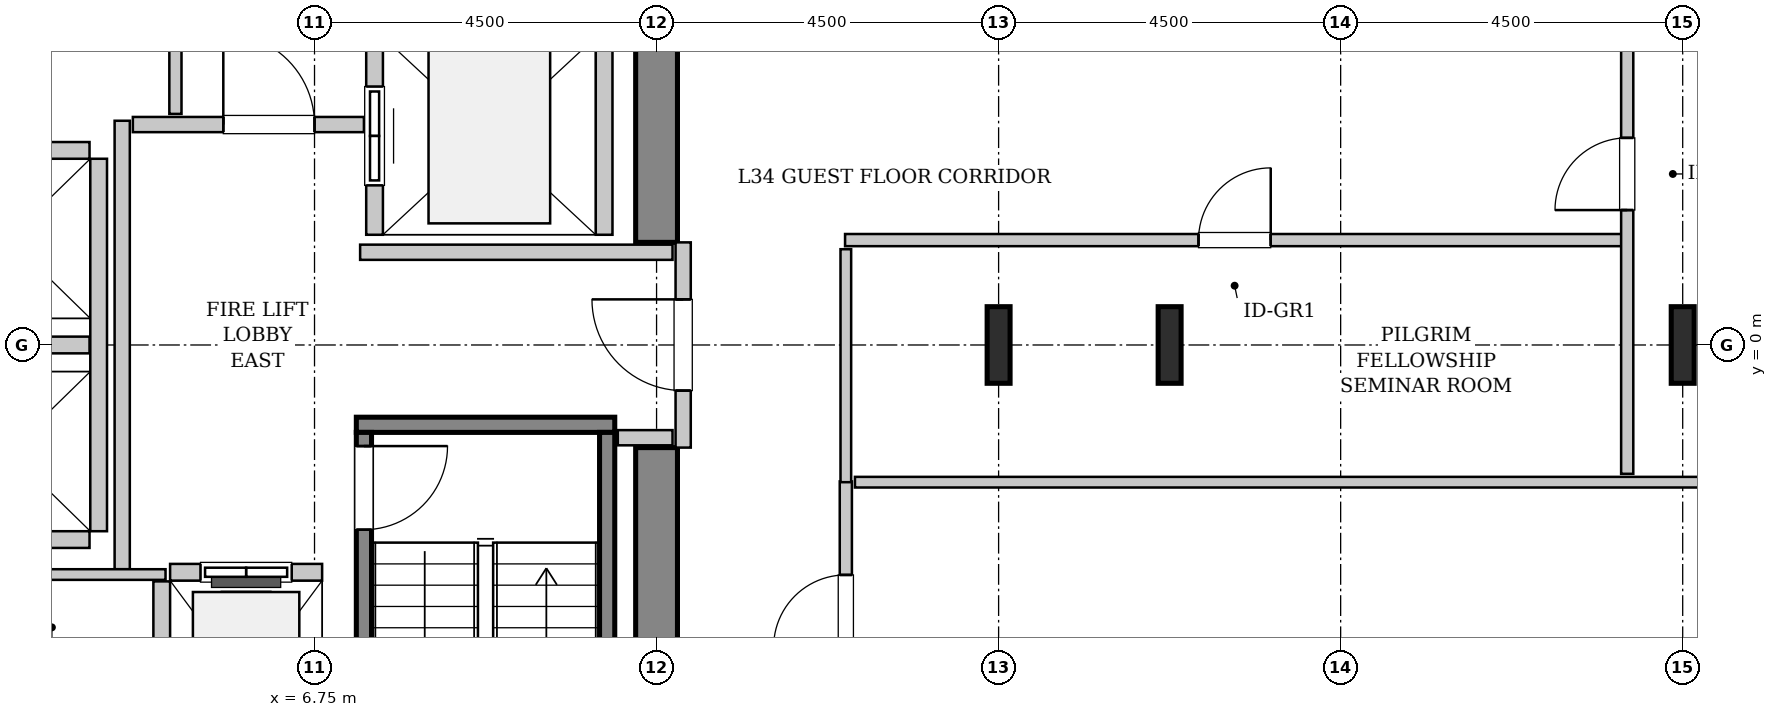
"""IFC4 building model, lengths in metres.
Left out: names, types, materials, properties, quantities, classifications, styles, units other than length and angle.
Written with IfcOpenShell. Run it as: python <this file> out.ifc"""

import sys

from ifc_helpers import new_model, si_unit, direction, frame, frame_2d, origin, origin_2d, place, context, subcontext, project, spatial, rectangle, i_section, extrude, source, transform, mapped, element, fill, save


model = new_model("IFC4")
c1 = context("Model", 3, precision=1e-05, world=origin(), true_north=direction((0.0, 1.0)))
c2 = subcontext(c1, "Body", "Model", "MODEL_VIEW")
j1 = project(units=[si_unit("LENGTHUNIT", "METRE"), si_unit("PLANEANGLEUNIT", "RADIAN")], contexts=[c1])
p1 = place(None, origin())
s1 = spatial("IfcSite", under=j1, at=p1, CompositionType="ELEMENT")
p2 = place(p1, origin())
s2 = spatial("IfcBuilding", under=s1, at=p2, CompositionType="ELEMENT")
p3 = place(p2, frame((0.0, 0.0, 140.2)))
s3 = spatial("IfcBuildingStorey", under=s2, at=p3, CompositionType="ELEMENT", Elevation=140.2)
m1 = source(origin(), c2, "Body", "SweptSolid", [
    extrude(rectangle(XDim=7.375, YDim=0.55, at=frame_2d((3.688, 0.0))), origin(), (0.0, 0.0, 1.0), 3.8),
])
for number, where, z_axis, x_axis in (
    (1, (11.25, -8.725, 0.0), (0.0, 0.0, 1.0), (0.0, 1.0, 0.0)),
    (2, (11.25, 1.35, 0.0), (0.0, 0.0, 1.0), (0.0, 1.0, 0.0)),
):
    element("IfcWall", number, at=place(p3, frame(where, z_axis=z_axis, x_axis=x_axis)), inside=s3, PredefinedType="SHEAR", context=c2, shape_type="MappedRepresentation", body=[
        mapped(m1, transform((0.0, 0.0, 0.0), x_axis=(1.0, 0.0, 0.0), y_axis=(0.0, 1.0, 0.0), z_axis=(0.0, 0.0, 1.0), scale=1.0)),
    ])
m2 = source(origin(), c2, "Body", "SweptSolid", [
    extrude(i_section(OverallWidth=0.302, OverallDepth=1.008, WebThickness=0.021, FlangeThickness=0.04, FilletRadius=0.03, at=origin_2d()), origin(), (0.0, 0.0, 1.0), 3.8),
])
for number, where, z_axis, x_axis in (
    (3, (15.75, 0.0, 0.0), (0.0, 0.0, 1.0), (1.0, 0.0, 0.0)),
    (4, (18.0, 0.0, 0.0), (0.0, 0.0, 1.0), (1.0, 0.0, 0.0)),
    (5, (24.75, 0.0, 0.0), (0.0, 0.0, 1.0), (1.0, 0.0, 0.0)),
):
    element("IfcColumn", number, at=place(p3, frame(where, z_axis=z_axis, x_axis=x_axis)), inside=s3, PredefinedType="COLUMN", context=c2, shape_type="MappedRepresentation", body=[
        mapped(m2, transform((0.0, 0.0, 0.0), x_axis=(1.0, 0.0, 0.0), y_axis=(0.0, 1.0, 0.0), z_axis=(0.0, 0.0, 1.0), scale=1.0)),
    ])
m3 = source(origin(), c2, "Body", "SweptSolid", [
    extrude(rectangle(XDim=3.4, YDim=0.2, at=frame_2d((1.7, 0.0))), origin(), (0.0, 0.0, 1.0), 3.8),
])
p4 = place(p3, frame((7.3, -1.05, 0.0), z_axis=(0.0, 0.0, 1.0), x_axis=(1.0, 0.0, 0.0)))
e6 = element("IfcWall", 6, at=p4, inside=s3, PredefinedType="SOLIDWALL", context=c2, shape_type="MappedRepresentation", body=[
    mapped(m3, transform((0.0, 0.0, 0.0), x_axis=(1.0, 0.0, 0.0), y_axis=(0.0, 1.0, 0.0), z_axis=(0.0, 0.0, 1.0), scale=1.0)),
])
m4 = source(origin(), c2, "Body", "SweptSolid", [
    extrude(rectangle(XDim=7.1, YDim=0.2, at=frame_2d((3.55, 0.0))), origin(), (0.0, 0.0, 1.0), 3.8),
])
p5 = place(p3, frame((7.4, -1.15, 0.0), z_axis=(0.0, 0.0, 1.0), x_axis=(0.0, -1.0, 0.0)))
e7 = element("IfcWall", 7, at=p5, inside=s3, PredefinedType="SOLIDWALL", context=c2, shape_type="MappedRepresentation", body=[
    mapped(m4, transform((0.0, 0.0, 0.0), x_axis=(1.0, 0.0, 0.0), y_axis=(0.0, 1.0, 0.0), z_axis=(0.0, 0.0, 1.0), scale=1.0)),
])
p6 = place(p5, frame((0.18, 0.0, 0.0)))
e8 = element("IfcOpeningElement", 8, at=p6, cuts=e7, PredefinedType="OPENING", context=c2, shape_type="SweptSolid", body=[
    extrude(rectangle(XDim=1.1, YDim=2.15, at=frame_2d((0.55, 1.075))), frame((0.0, 0.11, 0.0), z_axis=(0.0, -1.0, 0.0), x_axis=(1.0, 0.0, 0.0)), (0.0, 0.0, 1.0), 0.22),
])
p7 = place(p3, frame((10.6, -1.15, 0.0), z_axis=(0.0, 0.0, 1.0), x_axis=(0.0, -1.0, 0.0)))
e9 = element("IfcWall", 9, at=p7, inside=s3, PredefinedType="SOLIDWALL", context=c2, shape_type="MappedRepresentation", body=[
    mapped(m4, transform((0.0, 0.0, 0.0), x_axis=(1.0, 0.0, 0.0), y_axis=(0.0, 1.0, 0.0), z_axis=(0.0, 0.0, 1.0), scale=1.0)),
])
m5 = source(origin(), c2, "Body", "SweptSolid", [
    extrude(rectangle(XDim=2.0, YDim=0.22, at=frame_2d((1.0, 0.0))), origin(), (0.0, 0.0, 1.0), 3.485),
])
p8 = place(p3, frame((6.85, -2.99, 0.0), z_axis=(0.0, 0.0, 1.0), x_axis=(-1.0, 0.0, 0.0)))
e10 = element("IfcWall", 10, at=p8, inside=s3, PredefinedType="SOLIDWALL", context=c2, shape_type="MappedRepresentation", body=[
    mapped(m5, transform((0.0, 0.0, 0.0), x_axis=(1.0, 0.0, 0.0), y_axis=(0.0, 1.0, 0.0), z_axis=(0.0, 0.0, 1.0), scale=1.0)),
])
p9 = place(p8, frame((0.4, 0.0, 0.0)))
e11 = element("IfcOpeningElement", 11, at=p9, cuts=e10, PredefinedType="OPENING", context=c2, shape_type="SweptSolid", body=[
    extrude(rectangle(XDim=1.2, YDim=2.2, at=frame_2d((0.6, 1.1))), frame((0.0, 0.12, 0.0), z_axis=(0.0, -1.0, 0.0), x_axis=(1.0, 0.0, 0.0)), (0.0, 0.0, 1.0), 0.24),
])
m6 = source(origin(), c2, "Body", "SweptSolid", [
    extrude(rectangle(XDim=2.68, YDim=0.22, at=frame_2d((1.34, 0.0))), origin(), (0.0, 0.0, 1.0), 3.485),
])
p10 = place(p3, frame((4.74, -3.11, 0.0), z_axis=(0.0, 0.0, 1.0), x_axis=(0.0, -1.0, 0.0)))
e12 = element("IfcWall", 12, at=p10, inside=s3, PredefinedType="SOLIDWALL", context=c2, shape_type="MappedRepresentation", body=[
    mapped(m6, transform((0.0, 0.0, 0.0), x_axis=(1.0, 0.0, 0.0), y_axis=(0.0, 1.0, 0.0), z_axis=(0.0, 0.0, 1.0), scale=1.0)),
])
m7 = source(origin(), c2, "Body", "SweptSolid", [
    extrude(rectangle(XDim=5.45, YDim=0.22, at=frame_2d((2.725, 0.0))), origin(), (0.0, 0.0, 1.0), 3.485),
])
p11 = place(p3, frame((7.54, 6.9, 0.0), z_axis=(0.0, 0.0, 1.0), x_axis=(0.0, -1.0, 0.0)))
e13 = element("IfcWall", 13, at=p11, inside=s3, PredefinedType="SOLIDWALL", context=c2, shape_type="MappedRepresentation", body=[
    mapped(m7, transform((0.0, 0.0, 0.0), x_axis=(1.0, 0.0, 0.0), y_axis=(0.0, 1.0, 0.0), z_axis=(0.0, 0.0, 1.0), scale=1.0)),
])
p12 = place(p11, frame((3.5, 0.0, 0.0)))
e14 = element("IfcOpeningElement", 14, at=p12, cuts=e13, PredefinedType="OPENING", context=c2, shape_type="SweptSolid", body=[
    extrude(rectangle(XDim=1.3, YDim=2.3, at=frame_2d((0.65, 1.15))), frame((0.0, 0.12, 0.0), z_axis=(0.0, -1.0, 0.0), x_axis=(1.0, 0.0, 0.0)), (0.0, 0.0, 1.0), 0.24),
])
p13 = place(p11, frame((0.65, 0.0, 0.0)))
e15 = element("IfcOpeningElement", 15, at=p13, cuts=e13, PredefinedType="OPENING", context=c2, shape_type="SweptSolid", body=[
    extrude(rectangle(XDim=1.3, YDim=2.3, at=frame_2d((0.65, 1.15))), frame((0.0, 0.12, 0.0), z_axis=(0.0, -1.0, 0.0), x_axis=(1.0, 0.0, 0.0)), (0.0, 0.0, 1.0), 0.24),
])
p14 = place(p3, frame((10.56, 1.45, 0.0), z_axis=(0.0, 0.0, 1.0), x_axis=(0.0, 1.0, 0.0)))
e16 = element("IfcWall", 16, at=p14, inside=s3, PredefinedType="SOLIDWALL", context=c2, shape_type="MappedRepresentation", body=[
    mapped(m7, transform((0.0, 0.0, 0.0), x_axis=(1.0, 0.0, 0.0), y_axis=(0.0, 1.0, 0.0), z_axis=(0.0, 0.0, 1.0), scale=1.0)),
])
m8 = source(origin(), c2, "Body", "SweptSolid", [
    extrude(rectangle(XDim=4.9, YDim=0.22, at=frame_2d((2.45, 0.0))), origin(), (0.0, 0.0, 1.0), 3.485),
])
p15 = place(p3, frame((3.91, -2.45, 0.0), z_axis=(0.0, 0.0, 1.0), x_axis=(0.0, 1.0, 0.0)))
e17 = element("IfcWall", 17, at=p15, inside=s3, PredefinedType="SOLIDWALL", context=c2, shape_type="MappedRepresentation", body=[
    mapped(m8, transform((0.0, 0.0, 0.0), x_axis=(1.0, 0.0, 0.0), y_axis=(0.0, 1.0, 0.0), z_axis=(0.0, 0.0, 1.0), scale=1.0)),
])
m9 = source(origin(), c2, "Body", "SweptSolid", [
    extrude(rectangle(XDim=2.13, YDim=0.22, at=frame_2d((1.065, 0.0))), origin(), (0.0, 0.0, 1.0), 3.485),
])
for number, where, z_axis, x_axis in (
    (18, (1.66, -2.56, 0.0), (0.0, 0.0, 1.0), (1.0, 0.0, 0.0)),
    (19, (1.66, 0.0, 0.0), (0.0, 0.0, 1.0), (1.0, 0.0, 0.0)),
    (20, (3.79, 2.56, 0.0), (0.0, 0.0, 1.0), (-1.0, 0.0, 0.0)),
):
    element("IfcWall", number, at=place(p3, frame(where, z_axis=z_axis, x_axis=x_axis)), inside=s3, PredefinedType="SOLIDWALL", context=c2, shape_type="MappedRepresentation", body=[
        mapped(m9, transform((0.0, 0.0, 0.0), x_axis=(1.0, 0.0, 0.0), y_axis=(0.0, 1.0, 0.0), z_axis=(0.0, 0.0, 1.0), scale=1.0)),
    ])
m10 = source(origin(), c2, "Body", "SweptSolid", [
    extrude(rectangle(XDim=2.7, YDim=0.2, at=frame_2d((1.35, 0.0))), origin(), (0.0, 0.0, 1.0), 2.375),
])
p16 = place(p3, frame((11.6, -1.35, 0.0), z_axis=(0.0, 0.0, 1.0), x_axis=(0.0, 1.0, 0.0)))
e21 = element("IfcWall", 21, at=p16, inside=s3, PredefinedType="PARTITIONING", context=c2, shape_type="MappedRepresentation", body=[
    mapped(m10, transform((0.0, 0.0, 0.0), x_axis=(1.0, 0.0, 0.0), y_axis=(0.0, 1.0, 0.0), z_axis=(0.0, 0.0, 1.0), scale=1.0)),
])
p17 = place(p16, frame((0.75, 0.0, 0.0)))
e22 = element("IfcOpeningElement", 22, at=p17, cuts=e21, PredefinedType="OPENING", context=c2, shape_type="SweptSolid", body=[
    extrude(rectangle(XDim=1.2, YDim=2.15, at=frame_2d((0.6, 1.075))), frame((0.0, 0.11, 0.0), z_axis=(0.0, -1.0, 0.0), x_axis=(1.0, 0.0, 0.0)), (0.0, 0.0, 1.0), 0.22),
])
m11 = source(origin(), c2, "Body", "SweptSolid", [
    extrude(rectangle(XDim=5.9, YDim=0.2, at=frame_2d((2.95, 0.0))), origin(), (0.0, 0.0, 1.0), 3.485),
])
p18 = place(p3, frame((4.22, -2.95, 0.0), z_axis=(0.0, 0.0, 1.0), x_axis=(0.0, 1.0, 0.0)))
e23 = element("IfcWall", 23, at=p18, inside=s3, PredefinedType="PARTITIONING", context=c2, shape_type="MappedRepresentation", body=[
    mapped(m11, transform((0.0, 0.0, 0.0), x_axis=(1.0, 0.0, 0.0), y_axis=(0.0, 1.0, 0.0), z_axis=(0.0, 0.0, 1.0), scale=1.0)),
])
m12 = source(origin(), c2, "Body", "SweptSolid", [
    extrude(rectangle(XDim=3.04, YDim=0.2, at=frame_2d((1.52, 0.0))), origin(), (0.0, 0.0, 1.0), 3.485),
])
p19 = place(p3, frame((4.36, 2.9, 0.0), z_axis=(0.0, 0.0, 1.0), x_axis=(1.0, 0.0, 0.0)))
e24 = element("IfcWall", 24, at=p19, inside=s3, PredefinedType="PARTITIONING", context=c2, shape_type="MappedRepresentation", body=[
    mapped(m12, transform((0.0, 0.0, 0.0), x_axis=(1.0, 0.0, 0.0), y_axis=(0.0, 1.0, 0.0), z_axis=(0.0, 0.0, 1.0), scale=1.0)),
])
p20 = place(p19, frame((1.19, 0.0, 0.0)))
e25 = element("IfcOpeningElement", 25, at=p20, cuts=e24, PredefinedType="OPENING", context=c2, shape_type="SweptSolid", body=[
    extrude(rectangle(XDim=1.2, YDim=2.15, at=frame_2d((0.6, 1.075))), frame((0.0, 0.11, 0.0), z_axis=(0.0, -1.0, 0.0), x_axis=(1.0, 0.0, 0.0)), (0.0, 0.0, 1.0), 0.22),
])
m13 = source(origin(), c2, "Body", "SweptSolid", [
    extrude(rectangle(XDim=4.11, YDim=0.2, at=frame_2d((2.055, 0.0))), origin(), (0.0, 0.0, 1.0), 3.485),
])
p21 = place(p3, frame((7.35, 1.22, 0.0), z_axis=(0.0, 0.0, 1.0), x_axis=(1.0, 0.0, 0.0)))
e26 = element("IfcWall", 26, at=p21, inside=s3, PredefinedType="PARTITIONING", context=c2, shape_type="MappedRepresentation", body=[
    mapped(m13, transform((0.0, 0.0, 0.0), x_axis=(1.0, 0.0, 0.0), y_axis=(0.0, 1.0, 0.0), z_axis=(0.0, 0.0, 1.0), scale=1.0)),
])
m14 = source(origin(), c2, "Body", "SweptSolid", [
    extrude(rectangle(XDim=0.72, YDim=0.2, at=frame_2d((0.36, 0.0))), origin(), (0.0, 0.0, 1.0), 3.485),
])
p22 = place(p3, frame((10.74, -1.22, 0.0), z_axis=(0.0, 0.0, 1.0), x_axis=(1.0, 0.0, 0.0)))
e27 = element("IfcWall", 27, at=p22, inside=s3, PredefinedType="PARTITIONING", context=c2, shape_type="MappedRepresentation", body=[
    mapped(m14, transform((0.0, 0.0, 0.0), x_axis=(1.0, 0.0, 0.0), y_axis=(0.0, 1.0, 0.0), z_axis=(0.0, 0.0, 1.0), scale=1.0)),
])
m15 = source(origin(), c2, "Body", "SweptSolid", [
    extrude(rectangle(XDim=3.015, YDim=0.16, at=frame_2d((1.507, 0.0))), origin(), (0.0, 0.0, 1.0), 3.485),
])
p23 = place(p3, frame((4.92, 3.04, 0.0), z_axis=(0.0, 0.0, 1.0), x_axis=(0.0, 1.0, 0.0)))
e28 = element("IfcWall", 28, at=p23, inside=s3, PredefinedType="PARTITIONING", context=c2, shape_type="MappedRepresentation", body=[
    mapped(m15, transform((0.0, 0.0, 0.0), x_axis=(1.0, 0.0, 0.0), y_axis=(0.0, 1.0, 0.0), z_axis=(0.0, 0.0, 1.0), scale=1.0)),
])
m16 = source(origin(), c2, "Body", "SweptSolid", [
    extrude(rectangle(XDim=3.15, YDim=0.14, at=frame_2d((1.575, 0.0))), origin(), (0.0, 0.0, 1.0), 3.485),
])
p24 = place(p3, frame((1.64, -3.02, 0.0), z_axis=(0.0, 0.0, 1.0), x_axis=(1.0, 0.0, 0.0)))
e29 = element("IfcWall", 29, at=p24, inside=s3, PredefinedType="PARTITIONING", context=c2, shape_type="MappedRepresentation", body=[
    mapped(m16, transform((0.0, 0.0, 0.0), x_axis=(1.0, 0.0, 0.0), y_axis=(0.0, 1.0, 0.0), z_axis=(0.0, 0.0, 1.0), scale=1.0)),
])
m17 = source(origin(), c2, "Body", "SweptSolid", [
    extrude(rectangle(XDim=3.41, YDim=0.16, at=frame_2d((1.705, 0.0))), origin(), (0.0, 0.0, 1.0), 3.485),
])
p25 = place(p3, frame((13.74, -5.205, 0.0), z_axis=(0.0, 0.0, 1.0), x_axis=(0.0, 1.0, 0.0)))
e30 = element("IfcWall", 30, at=p25, inside=s3, PredefinedType="PARTITIONING", context=c2, shape_type="MappedRepresentation", body=[
    mapped(m17, transform((0.0, 0.0, 0.0), x_axis=(1.0, 0.0, 0.0), y_axis=(0.0, 1.0, 0.0), z_axis=(0.0, 0.0, 1.0), scale=1.0)),
])
p26 = place(p25, frame((1.23, 0.0, 0.0)))
e31 = element("IfcOpeningElement", 31, at=p26, cuts=e30, PredefinedType="OPENING", context=c2, shape_type="SweptSolid", body=[
    extrude(rectangle(XDim=0.95, YDim=2.1, at=frame_2d((0.475, 1.05))), frame((0.0, 0.09, 0.0), z_axis=(0.0, -1.0, 0.0), x_axis=(1.0, 0.0, 0.0)), (0.0, 0.0, 1.0), 0.18),
])
m18 = source(origin(), c2, "Body", "SweptSolid", [
    extrude(rectangle(XDim=20.43, YDim=0.14, at=frame_2d((10.215, 0.0))), origin(), (0.0, 0.0, 1.0), 3.485),
])
p27 = place(p3, frame((13.86, -1.805, 0.0), z_axis=(0.0, 0.0, 1.0), x_axis=(1.0, 0.0, 0.0)))
e32 = element("IfcWall", 32, at=p27, inside=s3, PredefinedType="PARTITIONING", context=c2, shape_type="MappedRepresentation", body=[
    mapped(m18, transform((0.0, 0.0, 0.0), x_axis=(1.0, 0.0, 0.0), y_axis=(0.0, 1.0, 0.0), z_axis=(0.0, 0.0, 1.0), scale=1.0)),
])
m19 = source(origin(), c2, "Body", "SweptSolid", [
    extrude(rectangle(XDim=10.25, YDim=0.16, at=frame_2d((5.125, 0.0))), origin(), (0.0, 0.0, 1.0), 3.485),
])
p28 = place(p3, frame((13.73, 1.38, 0.0), z_axis=(0.0, 0.0, 1.0), x_axis=(1.0, 0.0, 0.0)))
e33 = element("IfcWall", 33, at=p28, inside=s3, PredefinedType="PARTITIONING", context=c2, shape_type="MappedRepresentation", body=[
    mapped(m19, transform((0.0, 0.0, 0.0), x_axis=(1.0, 0.0, 0.0), y_axis=(0.0, 1.0, 0.0), z_axis=(0.0, 0.0, 1.0), scale=1.0)),
])
p29 = place(p28, frame((4.65, 0.0, 0.0)))
e34 = element("IfcOpeningElement", 34, at=p29, cuts=e33, PredefinedType="OPENING", context=c2, shape_type="SweptSolid", body=[
    extrude(rectangle(XDim=0.95, YDim=2.1, at=frame_2d((0.475, 1.05))), frame((0.0, 0.09, 0.0), z_axis=(0.0, -1.0, 0.0), x_axis=(1.0, 0.0, 0.0)), (0.0, 0.0, 1.0), 0.18),
])
m20 = source(origin(), c2, "Body", "SweptSolid", [
    extrude(rectangle(XDim=3.065, YDim=0.14, at=frame_2d((1.532, 0.0))), origin(), (0.0, 0.0, 1.0), 3.485),
])
p30 = place(p3, frame((13.74, -1.805, 0.0), z_axis=(0.0, 0.0, 1.0), x_axis=(0.0, 1.0, 0.0)))
e35 = element("IfcWall", 35, at=p30, inside=s3, PredefinedType="PARTITIONING", context=c2, shape_type="MappedRepresentation", body=[
    mapped(m20, transform((0.0, 0.0, 0.0), x_axis=(1.0, 0.0, 0.0), y_axis=(0.0, 1.0, 0.0), z_axis=(0.0, 0.0, 1.0), scale=1.0)),
])
m21 = source(origin(), c2, "Body", "SweptSolid", [
    extrude(rectangle(XDim=7.3, YDim=0.16, at=frame_2d((3.65, 0.0))), origin(), (0.0, 0.0, 1.0), 3.485),
])
p31 = place(p3, frame((24.02, -1.695, 0.0), z_axis=(0.0, 0.0, 1.0), x_axis=(0.0, 1.0, 0.0)))
e36 = element("IfcWall", 36, at=p31, inside=s3, PredefinedType="PARTITIONING", context=c2, shape_type="MappedRepresentation", body=[
    mapped(m21, transform((0.0, 0.0, 0.0), x_axis=(1.0, 0.0, 0.0), y_axis=(0.0, 1.0, 0.0), z_axis=(0.0, 0.0, 1.0), scale=1.0)),
])
p32 = place(p31, frame((3.47, 0.0, 0.0)))
e37 = element("IfcOpeningElement", 37, at=p32, cuts=e36, PredefinedType="OPENING", context=c2, shape_type="SweptSolid", body=[
    extrude(rectangle(XDim=0.95, YDim=2.1, at=frame_2d((0.475, 1.05))), frame((0.0, 0.09, 0.0), z_axis=(0.0, -1.0, 0.0), x_axis=(1.0, 0.0, 0.0)), (0.0, 0.0, 1.0), 0.18),
])
m22 = source(origin(), c2, "Body", "SweptSolid", [
    extrude(rectangle(XDim=1.1, YDim=2.15, at=frame_2d((0.55, 1.075))), frame((0.0, 0.025, 0.0), z_axis=(0.0, -1.0, 0.0), x_axis=(1.0, 0.0, 0.0)), (0.0, 0.0, 1.0), 0.05),
])
p33 = place(p6, origin())
e38 = element("IfcDoor", 38, at=p33, inside=s3, OperationType="SINGLE_SWING_LEFT", PredefinedType="DOOR", context=c2, shape_type="MappedRepresentation", body=[
    mapped(m22, transform((0.0, 0.0, 0.0), x_axis=(1.0, 0.0, 0.0), y_axis=(0.0, 1.0, 0.0), z_axis=(0.0, 0.0, 1.0), scale=1.0)),
])
fill(e8, e38)
m23 = source(origin(), c2, "Body", "SweptSolid", [
    extrude(rectangle(XDim=1.2, YDim=2.2, at=frame_2d((0.6, 1.1))), frame((0.0, 0.025, 0.0), z_axis=(0.0, -1.0, 0.0), x_axis=(1.0, 0.0, 0.0)), (0.0, 0.0, 1.0), 0.05),
])
p34 = place(p9, origin())
e39 = element("IfcDoor", 39, at=p34, inside=s3, OperationType="SLIDING_TO_LEFT", PredefinedType="DOOR", context=c2, shape_type="MappedRepresentation", body=[
    mapped(m23, transform((0.0, 0.0, 0.0), x_axis=(1.0, 0.0, 0.0), y_axis=(0.0, 1.0, 0.0), z_axis=(0.0, 0.0, 1.0), scale=1.0)),
])
fill(e11, e39)
m24 = source(origin(), c2, "Body", "SweptSolid", [
    extrude(rectangle(XDim=1.3, YDim=2.3, at=frame_2d((0.65, 1.15))), frame((0.0, 0.025, 0.0), z_axis=(0.0, -1.0, 0.0), x_axis=(1.0, 0.0, 0.0)), (0.0, 0.0, 1.0), 0.05),
])
p35 = place(p12, origin())
e40 = element("IfcDoor", 40, at=p35, inside=s3, OperationType="SLIDING_TO_RIGHT", PredefinedType="DOOR", context=c2, shape_type="MappedRepresentation", body=[
    mapped(m24, transform((0.0, 0.0, 0.0), x_axis=(1.0, 0.0, 0.0), y_axis=(0.0, 1.0, 0.0), z_axis=(0.0, 0.0, 1.0), scale=1.0)),
])
fill(e14, e40)
m25 = source(origin(), c2, "Body", "SweptSolid", [
    extrude(rectangle(XDim=1.2, YDim=2.15, at=frame_2d((0.6, 1.075))), frame((0.0, 0.025, 0.0), z_axis=(0.0, -1.0, 0.0), x_axis=(1.0, 0.0, 0.0)), (0.0, 0.0, 1.0), 0.05),
])
p36 = place(p17, origin())
e41 = element("IfcDoor", 41, at=p36, inside=s3, OperationType="SINGLE_SWING_RIGHT", PredefinedType="DOOR", context=c2, shape_type="MappedRepresentation", body=[
    mapped(m25, transform((0.0, 0.0, 0.0), x_axis=(1.0, 0.0, 0.0), y_axis=(0.0, 1.0, 0.0), z_axis=(0.0, 0.0, 1.0), scale=1.0)),
])
fill(e22, e41)
p37 = place(p20, origin())
e42 = element("IfcDoor", 42, at=p37, inside=s3, OperationType="SINGLE_SWING_LEFT", PredefinedType="DOOR", context=c2, shape_type="MappedRepresentation", body=[
    mapped(m25, transform((0.0, 0.0, 0.0), x_axis=(1.0, 0.0, 0.0), y_axis=(0.0, 1.0, 0.0), z_axis=(0.0, 0.0, 1.0), scale=1.0)),
])
fill(e25, e42)
m26 = source(origin(), c2, "Body", "SweptSolid", [
    extrude(rectangle(XDim=0.95, YDim=2.1, at=frame_2d((0.475, 1.05))), frame((0.0, 0.025, 0.0), z_axis=(0.0, -1.0, 0.0), x_axis=(1.0, 0.0, 0.0)), (0.0, 0.0, 1.0), 0.05),
])
p38 = place(p26, origin())
e43 = element("IfcDoor", 43, at=p38, inside=s3, OperationType="SINGLE_SWING_LEFT", PredefinedType="DOOR", context=c2, shape_type="MappedRepresentation", body=[
    mapped(m26, transform((0.0, 0.0, 0.0), x_axis=(1.0, 0.0, 0.0), y_axis=(0.0, 1.0, 0.0), z_axis=(0.0, 0.0, 1.0), scale=1.0)),
])
fill(e31, e43)
p39 = place(p29, origin())
e44 = element("IfcDoor", 44, at=p39, inside=s3, OperationType="SINGLE_SWING_RIGHT", PredefinedType="DOOR", context=c2, shape_type="MappedRepresentation", body=[
    mapped(m26, transform((0.0, 0.0, 0.0), x_axis=(1.0, 0.0, 0.0), y_axis=(0.0, 1.0, 0.0), z_axis=(0.0, 0.0, 1.0), scale=1.0)),
])
fill(e34, e44)
p40 = place(p32, origin())
e45 = element("IfcDoor", 45, at=p40, inside=s3, OperationType="SINGLE_SWING_LEFT", PredefinedType="DOOR", context=c2, shape_type="MappedRepresentation", body=[
    mapped(m26, transform((0.0, 0.0, 0.0), x_axis=(1.0, 0.0, 0.0), y_axis=(0.0, 1.0, 0.0), z_axis=(0.0, 0.0, 1.0), scale=1.0)),
])
fill(e37, e45)
save(model, sys.argv[1])
